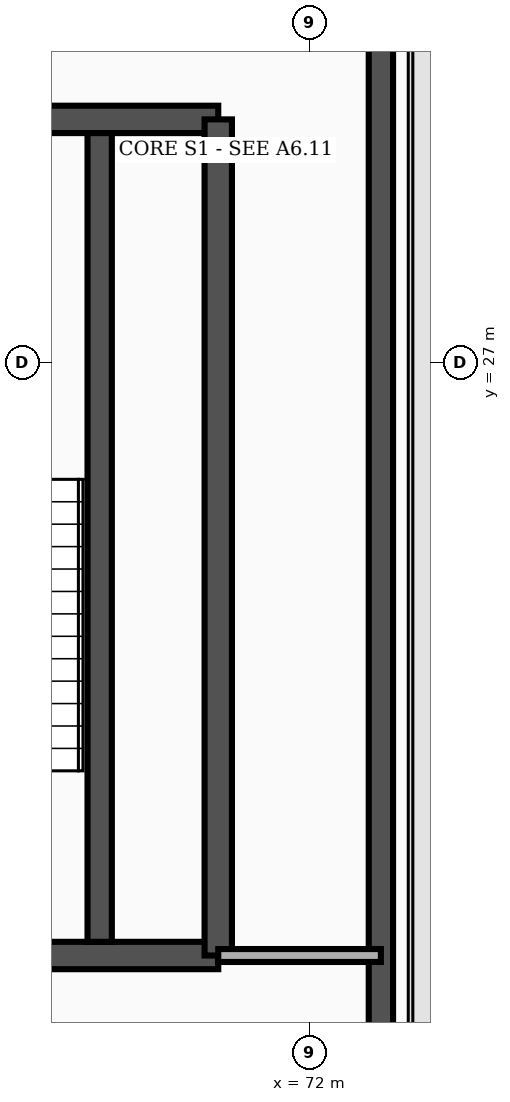
"""IFC4 building model, lengths in metres.
Left out: names, types, materials, properties, quantities, classifications, styles, units other than length and angle.
Written with IfcOpenShell. Run it as: python <this file> out.ifc"""

import sys

from ifc_helpers import new_model, si_unit, direction, frame, frame_2d, origin, place, context, subcontext, project, spatial, rectangle, extrude, element, save


model = new_model("IFC4")
c1 = context("Model", 3, precision=1e-05, world=origin(), true_north=direction((0.0, 1.0)))
c2 = subcontext(c1, "Body", "Model", "MODEL_VIEW")
j1 = project(units=[si_unit("LENGTHUNIT", "METRE"), si_unit("PLANEANGLEUNIT", "RADIAN")], contexts=[c1])
p1 = place(None, origin())
s1 = spatial("IfcSite", under=j1, at=p1, CompositionType="ELEMENT")
p2 = place(p1, origin())
s2 = spatial("IfcBuilding", under=s1, at=p2, CompositionType="ELEMENT")
p3 = place(p2, frame((0.0, 0.0, -4.5)))
s3 = spatial("IfcBuildingStorey", under=s2, at=p3, CompositionType="ELEMENT", Elevation=-4.5)
p4 = place(p3, frame((72.94, 1.34, 0.0), z_axis=(0.0, 0.0, 1.0), x_axis=(0.0, 1.0, 0.0)))
e1 = element("IfcWall", 1, at=p4, inside=s3, PredefinedType="SHEAR", context=c2, shape_type="SweptSolid", body=[
    extrude(rectangle(XDim=31.66, YDim=0.32, at=frame_2d((15.83, 0.0))), origin(), (0.0, 0.0, 1.0), 4.24),
])
for number, where, z_axis, x_axis in (
    (2, (64.2, 19.2, 0.0), (0.0, 0.0, 1.0), (1.0, 0.0, 0.0)),
    (3, (64.2, 30.2, 0.0), (0.0, 0.0, 1.0), (1.0, 0.0, 0.0)),
):
    element("IfcWall", number, at=place(p3, frame(where, z_axis=z_axis, x_axis=x_axis)), inside=s3, PredefinedType="SHEAR", context=c2, shape_type="SweptSolid", body=[
        extrude(rectangle(XDim=6.6, YDim=0.36, at=frame_2d((3.3, 0.0))), origin(), (0.0, 0.0, 1.0), 4.24),
    ])
p5 = place(p3, frame((70.8, 19.2, 0.0), z_axis=(0.0, 0.0, 1.0), x_axis=(0.0, 1.0, 0.0)))
e4 = element("IfcWall", 4, at=p5, inside=s3, PredefinedType="SHEAR", context=c2, shape_type="SweptSolid", body=[
    extrude(rectangle(XDim=11.0, YDim=0.36, at=frame_2d((5.5, 0.0))), origin(), (0.0, 0.0, 1.0), 4.24),
])
p6 = place(p3, frame((69.24, 19.38, 0.0), z_axis=(0.0, 0.0, 1.0), x_axis=(0.0, 1.0, 0.0)))
e5 = element("IfcWall", 5, at=p6, inside=s3, PredefinedType="SHEAR", context=c2, shape_type="SweptSolid", body=[
    extrude(rectangle(XDim=10.64, YDim=0.32, at=frame_2d((5.32, 0.0))), origin(), (0.0, 0.0, 1.0), 4.24),
])
p7 = place(p3, frame((70.8, 19.2, 0.0), z_axis=(0.0, 0.0, 1.0), x_axis=(1.0, 0.0, 0.0)))
e6 = element("IfcWall", 6, at=p7, inside=s3, PredefinedType="PARTITIONING", context=c2, shape_type="SweptSolid", body=[
    extrude(rectangle(XDim=2.14, YDim=0.17, at=frame_2d((1.07, 0.0))), origin(), (0.0, 0.0, 1.0), 4.24),
])
save(model, sys.argv[1])
